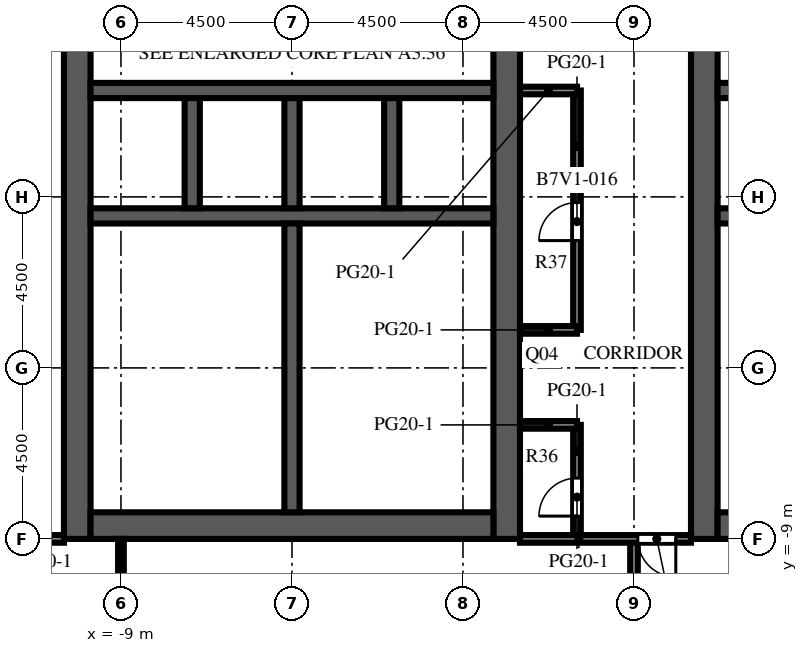
"""IFC4 building model, lengths in metres.
Left out: names, types, materials, properties, quantities, classifications, styles, units other than length and angle.
Written with IfcOpenShell. Run it as: python <this file> out.ifc"""

import sys

from ifc_helpers import new_model, si_unit, direction, frame, frame_2d, origin, place, context, subcontext, project, spatial, rectangle, extrude, element, fill, save


model = new_model("IFC4")
c1 = context("Model", 3, precision=1e-05, world=origin(), true_north=direction((0.0, 1.0)))
c2 = subcontext(c1, "Body", "Model", "MODEL_VIEW")
j1 = project(units=[si_unit("LENGTHUNIT", "METRE"), si_unit("PLANEANGLEUNIT", "RADIAN")], contexts=[c1])
p1 = place(None, origin())
s1 = spatial("IfcSite", under=j1, at=p1, CompositionType="ELEMENT")
p2 = place(p1, origin())
s2 = spatial("IfcBuilding", under=s1, at=p2, CompositionType="ELEMENT")
p3 = place(p2, frame((0.0, 0.0, 252.1)))
s3 = spatial("IfcBuildingStorey", under=s2, at=p3, CompositionType="ELEMENT", Elevation=252.1)
p4 = place(p3, frame((-10.15, -9.0, 0.0), z_axis=(0.0, 0.0, 1.0), x_axis=(0.0, 1.0, 0.0)))
e1 = element("IfcWall", 1, at=p4, inside=s3, PredefinedType="SHEAR", context=c2, shape_type="SweptSolid", body=[
    extrude(rectangle(XDim=27.5, YDim=0.7, at=frame_2d((13.75, 0.0))), origin(), (0.0, 0.0, 1.0), 4.1),
])
p5 = place(p4, frame((12.55, 0.0, 0.0)))
e2 = element("IfcOpeningElement", 2, at=p5, cuts=e1, PredefinedType="OPENING", context=c2, shape_type="SweptSolid", body=[
    extrude(rectangle(XDim=2.4, YDim=2.4, at=frame_2d((1.2, 1.2))), frame((0.0, 0.36, 0.0), z_axis=(0.0, -1.0, 0.0), x_axis=(1.0, 0.0, 0.0)), (0.0, 0.0, 1.0), 0.72),
])
p6 = place(p4, frame((6.825, 0.0, 0.0)))
e3 = element("IfcOpeningElement", 3, at=p6, cuts=e1, PredefinedType="OPENING", context=c2, shape_type="SweptSolid", body=[
    extrude(rectangle(XDim=1.2, YDim=2.1, at=frame_2d((0.6, 1.05))), frame((0.0, 0.36, 0.0), z_axis=(0.0, -1.0, 0.0), x_axis=(1.0, 0.0, 0.0)), (0.0, 0.0, 1.0), 0.72),
])
p7 = place(p4, frame((19.475, 0.0, 0.0)))
e4 = element("IfcOpeningElement", 4, at=p7, cuts=e1, PredefinedType="OPENING", context=c2, shape_type="SweptSolid", body=[
    extrude(rectangle(XDim=1.2, YDim=2.1, at=frame_2d((0.6, 1.05))), frame((0.0, 0.36, 0.0), z_axis=(0.0, -1.0, 0.0), x_axis=(1.0, 0.0, 0.0)), (0.0, 0.0, 1.0), 0.72),
])
p8 = place(p3, frame((1.15, -9.0, 0.0), z_axis=(0.0, 0.0, 1.0), x_axis=(0.0, 1.0, 0.0)))
e5 = element("IfcWall", 5, at=p8, inside=s3, PredefinedType="SHEAR", context=c2, shape_type="SweptSolid", body=[
    extrude(rectangle(XDim=27.5, YDim=0.7, at=frame_2d((13.75, 0.0))), origin(), (0.0, 0.0, 1.0), 4.1),
])
p9 = place(p8, frame((12.55, 0.0, 0.0)))
e6 = element("IfcOpeningElement", 6, at=p9, cuts=e5, PredefinedType="OPENING", context=c2, shape_type="SweptSolid", body=[
    extrude(rectangle(XDim=2.4, YDim=2.4, at=frame_2d((1.2, 1.2))), frame((0.0, 0.36, 0.0), z_axis=(0.0, -1.0, 0.0), x_axis=(1.0, 0.0, 0.0)), (0.0, 0.0, 1.0), 0.72),
])
p10 = place(p8, frame((3.9, 0.0, 0.0)))
e7 = element("IfcOpeningElement", 7, at=p10, cuts=e5, PredefinedType="OPENING", context=c2, shape_type="SweptSolid", body=[
    extrude(rectangle(XDim=1.2, YDim=2.1, at=frame_2d((0.6, 1.05))), frame((0.0, 0.36, 0.0), z_axis=(0.0, -1.0, 0.0), x_axis=(1.0, 0.0, 0.0)), (0.0, 0.0, 1.0), 0.72),
])
p11 = place(p8, frame((22.4, 0.0, 0.0)))
e8 = element("IfcOpeningElement", 8, at=p11, cuts=e5, PredefinedType="OPENING", context=c2, shape_type="SweptSolid", body=[
    extrude(rectangle(XDim=1.2, YDim=2.1, at=frame_2d((0.6, 1.05))), frame((0.0, 0.36, 0.0), z_axis=(0.0, -1.0, 0.0), x_axis=(1.0, 0.0, 0.0)), (0.0, 0.0, 1.0), 0.72),
])
p12 = place(p3, frame((-9.8, -8.65, 0.0), z_axis=(0.0, 0.0, 1.0), x_axis=(1.0, 0.0, 0.0)))
e9 = element("IfcWall", 9, at=p12, inside=s3, PredefinedType="SHEAR", context=c2, shape_type="SweptSolid", body=[
    extrude(rectangle(XDim=10.6, YDim=0.7, at=frame_2d((5.3, 0.0))), origin(), (0.0, 0.0, 1.0), 4.1),
])
p13 = place(p3, frame((-9.8, -0.5, 0.0), z_axis=(0.0, 0.0, 1.0), x_axis=(1.0, 0.0, 0.0)))
e10 = element("IfcWall", 10, at=p13, inside=s3, PredefinedType="SHEAR", context=c2, shape_type="SweptSolid", body=[
    extrude(rectangle(XDim=10.6, YDim=0.4, at=frame_2d((5.3, 0.0))), origin(), (0.0, 0.0, 1.0), 4.1),
])
p14 = place(p3, frame((-9.8, 2.8, 0.0), z_axis=(0.0, 0.0, 1.0), x_axis=(1.0, 0.0, 0.0)))
e11 = element("IfcWall", 11, at=p14, inside=s3, PredefinedType="SHEAR", context=c2, shape_type="SweptSolid", body=[
    extrude(rectangle(XDim=10.6, YDim=0.4, at=frame_2d((5.3, 0.0))), origin(), (0.0, 0.0, 1.0), 4.1),
])
p15 = place(p14, frame((0.688, 0.0, 0.0)))
e12 = element("IfcOpeningElement", 12, at=p15, cuts=e11, PredefinedType="OPENING", context=c2, shape_type="SweptSolid", body=[
    extrude(rectangle(XDim=1.1, YDim=2.1, at=frame_2d((0.55, 1.05))), frame((0.0, 0.21, 0.0), z_axis=(0.0, -1.0, 0.0), x_axis=(1.0, 0.0, 0.0)), (0.0, 0.0, 1.0), 0.42),
])
p16 = place(p14, frame((3.438, 0.0, 0.0)))
e13 = element("IfcOpeningElement", 13, at=p16, cuts=e11, PredefinedType="OPENING", context=c2, shape_type="SweptSolid", body=[
    extrude(rectangle(XDim=1.1, YDim=2.1, at=frame_2d((0.55, 1.05))), frame((0.0, 0.21, 0.0), z_axis=(0.0, -1.0, 0.0), x_axis=(1.0, 0.0, 0.0)), (0.0, 0.0, 1.0), 0.42),
])
p17 = place(p14, frame((6.113, 0.0, 0.0)))
e14 = element("IfcOpeningElement", 14, at=p17, cuts=e11, PredefinedType="OPENING", context=c2, shape_type="SweptSolid", body=[
    extrude(rectangle(XDim=1.0, YDim=2.1, at=frame_2d((0.5, 1.05))), frame((0.0, 0.21, 0.0), z_axis=(0.0, -1.0, 0.0), x_axis=(1.0, 0.0, 0.0)), (0.0, 0.0, 1.0), 0.42),
])
p18 = place(p14, frame((8.863, 0.0, 0.0)))
e15 = element("IfcOpeningElement", 15, at=p18, cuts=e11, PredefinedType="OPENING", context=c2, shape_type="SweptSolid", body=[
    extrude(rectangle(XDim=1.0, YDim=2.1, at=frame_2d((0.5, 1.05))), frame((0.0, 0.21, 0.0), z_axis=(0.0, -1.0, 0.0), x_axis=(1.0, 0.0, 0.0)), (0.0, 0.0, 1.0), 0.42),
])
for number, where, z_axis, x_axis in (
    (16, (-7.125, -0.3, 0.0), (0.0, 0.0, 1.0), (0.0, 1.0, 0.0)),
    (17, (-4.5, -0.3, 0.0), (0.0, 0.0, 1.0), (0.0, 1.0, 0.0)),
    (18, (-1.875, -0.3, 0.0), (0.0, 0.0, 1.0), (0.0, 1.0, 0.0)),
):
    element("IfcWall", number, at=place(p3, frame(where, z_axis=z_axis, x_axis=x_axis)), inside=s3, PredefinedType="SHEAR", context=c2, shape_type="SweptSolid", body=[
        extrude(rectangle(XDim=2.9, YDim=0.4, at=frame_2d((1.45, 0.0))), origin(), (0.0, 0.0, 1.0), 4.1),
    ])
p19 = place(p3, frame((-4.5, -8.3, 0.0), z_axis=(0.0, 0.0, 1.0), x_axis=(0.0, 1.0, 0.0)))
e19 = element("IfcWall", 19, at=p19, inside=s3, PredefinedType="SHEAR", context=c2, shape_type="SweptSolid", body=[
    extrude(rectangle(XDim=7.6, YDim=0.4, at=frame_2d((3.8, 0.0))), origin(), (0.0, 0.0, 1.0), 4.1),
])
p20 = place(p3, frame((6.35, -9.0, 0.0), z_axis=(0.0, 0.0, 1.0), x_axis=(0.0, 1.0, 0.0)))
e20 = element("IfcWall", 20, at=p20, inside=s3, PredefinedType="SHEAR", context=c2, shape_type="SweptSolid", body=[
    extrude(rectangle(XDim=27.5, YDim=0.7, at=frame_2d((13.75, 0.0))), origin(), (0.0, 0.0, 1.0), 4.1),
])
p21 = place(p20, frame((12.55, 0.0, 0.0)))
e21 = element("IfcOpeningElement", 21, at=p21, cuts=e20, PredefinedType="OPENING", context=c2, shape_type="SweptSolid", body=[
    extrude(rectangle(XDim=2.4, YDim=2.4, at=frame_2d((1.2, 1.2))), frame((0.0, 0.36, 0.0), z_axis=(0.0, -1.0, 0.0), x_axis=(1.0, 0.0, 0.0)), (0.0, 0.0, 1.0), 0.72),
])
p22 = place(p20, frame((3.9, 0.0, 0.0)))
e22 = element("IfcOpeningElement", 22, at=p22, cuts=e20, PredefinedType="OPENING", context=c2, shape_type="SweptSolid", body=[
    extrude(rectangle(XDim=1.2, YDim=2.1, at=frame_2d((0.6, 1.05))), frame((0.0, 0.36, 0.0), z_axis=(0.0, -1.0, 0.0), x_axis=(1.0, 0.0, 0.0)), (0.0, 0.0, 1.0), 0.72),
])
p23 = place(p20, frame((22.4, 0.0, 0.0)))
e23 = element("IfcOpeningElement", 23, at=p23, cuts=e20, PredefinedType="OPENING", context=c2, shape_type="SweptSolid", body=[
    extrude(rectangle(XDim=1.2, YDim=2.1, at=frame_2d((0.6, 1.05))), frame((0.0, 0.36, 0.0), z_axis=(0.0, -1.0, 0.0), x_axis=(1.0, 0.0, 0.0)), (0.0, 0.0, 1.0), 0.72),
])
p24 = place(p3, frame((6.7, -8.65, 0.0), z_axis=(0.0, 0.0, 1.0), x_axis=(1.0, 0.0, 0.0)))
e24 = element("IfcWall", 24, at=p24, inside=s3, PredefinedType="SHEAR", context=c2, shape_type="SweptSolid", body=[
    extrude(rectangle(XDim=10.6, YDim=0.7, at=frame_2d((5.3, 0.0))), origin(), (0.0, 0.0, 1.0), 4.1),
])
p25 = place(p3, frame((6.7, -0.5, 0.0), z_axis=(0.0, 0.0, 1.0), x_axis=(1.0, 0.0, 0.0)))
e25 = element("IfcWall", 25, at=p25, inside=s3, PredefinedType="SHEAR", context=c2, shape_type="SweptSolid", body=[
    extrude(rectangle(XDim=10.6, YDim=0.4, at=frame_2d((5.3, 0.0))), origin(), (0.0, 0.0, 1.0), 4.1),
])
p26 = place(p3, frame((6.7, 2.8, 0.0), z_axis=(0.0, 0.0, 1.0), x_axis=(1.0, 0.0, 0.0)))
e26 = element("IfcWall", 26, at=p26, inside=s3, PredefinedType="SHEAR", context=c2, shape_type="SweptSolid", body=[
    extrude(rectangle(XDim=10.6, YDim=0.4, at=frame_2d((5.3, 0.0))), origin(), (0.0, 0.0, 1.0), 4.1),
])
p27 = place(p26, frame((0.688, 0.0, 0.0)))
e27 = element("IfcOpeningElement", 27, at=p27, cuts=e26, PredefinedType="OPENING", context=c2, shape_type="SweptSolid", body=[
    extrude(rectangle(XDim=1.1, YDim=2.1, at=frame_2d((0.55, 1.05))), frame((0.0, 0.21, 0.0), z_axis=(0.0, -1.0, 0.0), x_axis=(1.0, 0.0, 0.0)), (0.0, 0.0, 1.0), 0.42),
])
p28 = place(p26, frame((3.438, 0.0, 0.0)))
e28 = element("IfcOpeningElement", 28, at=p28, cuts=e26, PredefinedType="OPENING", context=c2, shape_type="SweptSolid", body=[
    extrude(rectangle(XDim=1.1, YDim=2.1, at=frame_2d((0.55, 1.05))), frame((0.0, 0.21, 0.0), z_axis=(0.0, -1.0, 0.0), x_axis=(1.0, 0.0, 0.0)), (0.0, 0.0, 1.0), 0.42),
])
p29 = place(p26, frame((6.113, 0.0, 0.0)))
e29 = element("IfcOpeningElement", 29, at=p29, cuts=e26, PredefinedType="OPENING", context=c2, shape_type="SweptSolid", body=[
    extrude(rectangle(XDim=1.0, YDim=2.1, at=frame_2d((0.5, 1.05))), frame((0.0, 0.21, 0.0), z_axis=(0.0, -1.0, 0.0), x_axis=(1.0, 0.0, 0.0)), (0.0, 0.0, 1.0), 0.42),
])
p30 = place(p26, frame((8.863, 0.0, 0.0)))
e30 = element("IfcOpeningElement", 30, at=p30, cuts=e26, PredefinedType="OPENING", context=c2, shape_type="SweptSolid", body=[
    extrude(rectangle(XDim=1.0, YDim=2.1, at=frame_2d((0.5, 1.05))), frame((0.0, 0.21, 0.0), z_axis=(0.0, -1.0, 0.0), x_axis=(1.0, 0.0, 0.0)), (0.0, 0.0, 1.0), 0.42),
])
p31 = place(p3, frame((-0.7, -8.3, 0.0), z_axis=(0.0, 0.0, 1.0), x_axis=(0.0, 1.0, 0.0)))
e31 = element("IfcWall", 31, at=p31, inside=s3, PredefinedType="PARTITIONING", context=c2, shape_type="SweptSolid", body=[
    extrude(rectangle(XDim=2.584, YDim=0.1, at=frame_2d((1.292, 0.0))), origin(), (0.0, 0.0, 1.0), 3.65),
])
p32 = place(p31, frame((0.792, 0.0, 0.0)))
e32 = element("IfcOpeningElement", 32, at=p32, cuts=e31, PredefinedType="OPENING", context=c2, shape_type="SweptSolid", body=[
    extrude(rectangle(XDim=1.0, YDim=2.1, at=frame_2d((0.5, 1.05))), frame((0.0, 0.06, 0.0), z_axis=(0.0, -1.0, 0.0), x_axis=(1.0, 0.0, 0.0)), (0.0, 0.0, 1.0), 0.12),
])
p33 = place(p3, frame((-0.7, -5.716, 0.0), z_axis=(0.0, 0.0, 1.0), x_axis=(0.0, 1.0, 0.0)))
e33 = element("IfcWall", 33, at=p33, inside=s3, PredefinedType="PARTITIONING", context=c2, shape_type="SweptSolid", body=[
    extrude(rectangle(XDim=2.128, YDim=0.1, at=frame_2d((1.064, 0.0))), origin(), (0.0, 0.0, 1.0), 3.65),
])
p34 = place(p33, frame((0.564, 0.0, 0.0)))
e34 = element("IfcOpeningElement", 34, at=p34, cuts=e33, PredefinedType="OPENING", context=c2, shape_type="SweptSolid", body=[
    extrude(rectangle(XDim=1.0, YDim=2.1, at=frame_2d((0.5, 1.05))), frame((0.0, 0.06, 0.0), z_axis=(0.0, -1.0, 0.0), x_axis=(1.0, 0.0, 0.0)), (0.0, 0.0, 1.0), 0.12),
])
p35 = place(p3, frame((-0.7, -3.588, 0.0), z_axis=(0.0, 0.0, 1.0), x_axis=(0.0, 1.0, 0.0)))
e35 = element("IfcWall", 35, at=p35, inside=s3, PredefinedType="PARTITIONING", context=c2, shape_type="SweptSolid", body=[
    extrude(rectangle(XDim=2.888, YDim=0.1, at=frame_2d((1.444, 0.0))), origin(), (0.0, 0.0, 1.0), 3.65),
])
p36 = place(p35, frame((0.944, 0.0, 0.0)))
e36 = element("IfcOpeningElement", 36, at=p36, cuts=e35, PredefinedType="OPENING", context=c2, shape_type="SweptSolid", body=[
    extrude(rectangle(XDim=1.0, YDim=2.1, at=frame_2d((0.5, 1.05))), frame((0.0, 0.06, 0.0), z_axis=(0.0, -1.0, 0.0), x_axis=(1.0, 0.0, 0.0)), (0.0, 0.0, 1.0), 0.12),
])
for number, where, z_axis, x_axis in (
    (37, (-4.3, -5.716, 0.0), (0.0, 0.0, 1.0), (1.0, 0.0, 0.0)),
    (38, (-4.3, -3.588, 0.0), (0.0, 0.0, 1.0), (1.0, 0.0, 0.0)),
):
    element("IfcWall", number, at=place(p3, frame(where, z_axis=z_axis, x_axis=x_axis)), inside=s3, PredefinedType="PARTITIONING", context=c2, shape_type="SweptSolid", body=[
        extrude(rectangle(XDim=3.6, YDim=0.1, at=frame_2d((1.8, 0.0))), origin(), (0.0, 0.0, 1.0), 3.65),
    ])
p37 = place(p3, frame((-9.0, -17.5, 0.0), z_axis=(0.0, 0.0, 1.0), x_axis=(0.0, 1.0, 0.0)))
e39 = element("IfcWall", 39, at=p37, inside=s3, PredefinedType="PARTITIONING", context=c2, shape_type="SweptSolid", body=[
    extrude(rectangle(XDim=8.5, YDim=0.15, at=frame_2d((4.25, 0.0))), origin(), (0.0, 0.0, 1.0), 3.65),
])
p38 = place(p3, frame((3.0, -9.0, 0.0), z_axis=(0.0, 0.0, 1.0), x_axis=(0.0, 1.0, 0.0)))
e40 = element("IfcWall", 40, at=p38, inside=s3, PredefinedType="PARTITIONING", context=c2, shape_type="SweptSolid", body=[
    extrude(rectangle(XDim=3.0, YDim=0.2, at=frame_2d((1.5, 0.0))), origin(), (0.0, 0.0, 1.0), 3.65),
])
p39 = place(p38, frame((0.6, 0.0, 0.0)))
e41 = element("IfcOpeningElement", 41, at=p39, cuts=e40, PredefinedType="OPENING", context=c2, shape_type="SweptSolid", body=[
    extrude(rectangle(XDim=1.0, YDim=2.1, at=frame_2d((0.5, 1.05))), frame((0.0, 0.11, 0.0), z_axis=(0.0, -1.0, 0.0), x_axis=(1.0, 0.0, 0.0)), (0.0, 0.0, 1.0), 0.22),
])
p40 = place(p3, frame((3.0, -3.5, 0.0), z_axis=(0.0, 0.0, 1.0), x_axis=(0.0, 1.0, 0.0)))
e42 = element("IfcWall", 42, at=p40, inside=s3, PredefinedType="PARTITIONING", context=c2, shape_type="SweptSolid", body=[
    extrude(rectangle(XDim=6.3, YDim=0.2, at=frame_2d((3.15, 0.0))), origin(), (0.0, 0.0, 1.0), 3.65),
])
p41 = place(p40, frame((2.35, 0.0, 0.0)))
e43 = element("IfcOpeningElement", 43, at=p41, cuts=e42, PredefinedType="OPENING", context=c2, shape_type="SweptSolid", body=[
    extrude(rectangle(XDim=1.0, YDim=2.1, at=frame_2d((0.5, 1.05))), frame((0.0, 0.11, 0.0), z_axis=(0.0, -1.0, 0.0), x_axis=(1.0, 0.0, 0.0)), (0.0, 0.0, 1.0), 0.22),
])
p42 = place(p3, frame((4.5, -22.1, 0.0), z_axis=(0.0, 0.0, 1.0), x_axis=(0.0, 1.0, 0.0)))
e44 = element("IfcWall", 44, at=p42, inside=s3, PredefinedType="PARTITIONING", context=c2, shape_type="SweptSolid", body=[
    extrude(rectangle(XDim=13.1, YDim=0.2, at=frame_2d((6.55, 0.0))), origin(), (0.0, 0.0, 1.0), 3.65),
])
p43 = place(p3, frame((-10.5, -9.0, 0.0), z_axis=(0.0, 0.0, 1.0), x_axis=(-1.0, 0.0, 0.0)))
e45 = element("IfcWall", 45, at=p43, inside=s3, PredefinedType="PARTITIONING", context=c2, shape_type="SweptSolid", body=[
    extrude(rectangle(XDim=3.0, YDim=0.2, at=frame_2d((1.5, 0.0))), origin(), (0.0, 0.0, 1.0), 3.65),
])
p44 = place(p43, frame((1.15, 0.0, 0.0)))
e46 = element("IfcOpeningElement", 46, at=p44, cuts=e45, PredefinedType="OPENING", context=c2, shape_type="SweptSolid", body=[
    extrude(rectangle(XDim=1.0, YDim=2.1, at=frame_2d((0.5, 1.05))), frame((0.0, 0.11, 0.0), z_axis=(0.0, -1.0, 0.0), x_axis=(1.0, 0.0, 0.0)), (0.0, 0.0, 1.0), 0.22),
])
p45 = place(p3, frame((6.0, -9.0, 0.0), z_axis=(0.0, 0.0, 1.0), x_axis=(-1.0, 0.0, 0.0)))
e47 = element("IfcWall", 47, at=p45, inside=s3, PredefinedType="PARTITIONING", context=c2, shape_type="SweptSolid", body=[
    extrude(rectangle(XDim=4.5, YDim=0.2, at=frame_2d((2.25, 0.0))), origin(), (0.0, 0.0, 1.0), 3.65),
])
p46 = place(p45, frame((0.4, 0.0, 0.0)))
e48 = element("IfcOpeningElement", 48, at=p46, cuts=e47, PredefinedType="OPENING", context=c2, shape_type="SweptSolid", body=[
    extrude(rectangle(XDim=1.0, YDim=2.1, at=frame_2d((0.5, 1.05))), frame((0.0, 0.11, 0.0), z_axis=(0.0, -1.0, 0.0), x_axis=(1.0, 0.0, 0.0)), (0.0, 0.0, 1.0), 0.22),
])
for number, where, z_axis, x_axis in (
    (49, (1.5, -6.0, 0.0), (0.0, 0.0, 1.0), (1.0, 0.0, 0.0)),
    (50, (1.5, -3.5, 0.0), (0.0, 0.0, 1.0), (1.0, 0.0, 0.0)),
    (51, (1.5, 2.8, 0.0), (0.0, 0.0, 1.0), (1.0, 0.0, 0.0)),
):
    element("IfcWall", number, at=place(p3, frame(where, z_axis=z_axis, x_axis=x_axis)), inside=s3, PredefinedType="PARTITIONING", context=c2, shape_type="SweptSolid", body=[
        extrude(rectangle(XDim=1.5, YDim=0.2, at=frame_2d((0.75, 0.0))), origin(), (0.0, 0.0, 1.0), 3.65),
    ])
p47 = place(p15, origin())
e52 = element("IfcDoor", 52, at=p47, inside=s3, OperationType="DOUBLE_DOOR_SLIDING", PredefinedType="DOOR", context=c2, shape_type="SweptSolid", body=[
    extrude(rectangle(XDim=1.1, YDim=2.1, at=frame_2d((0.55, 1.05))), frame((0.0, 0.025, 0.0), z_axis=(0.0, -1.0, 0.0), x_axis=(1.0, 0.0, 0.0)), (0.0, 0.0, 1.0), 0.05),
])
fill(e12, e52)
p48 = place(p16, origin())
e53 = element("IfcDoor", 53, at=p48, inside=s3, OperationType="DOUBLE_DOOR_SLIDING", PredefinedType="DOOR", context=c2, shape_type="SweptSolid", body=[
    extrude(rectangle(XDim=1.1, YDim=2.1, at=frame_2d((0.55, 1.05))), frame((0.0, 0.025, 0.0), z_axis=(0.0, -1.0, 0.0), x_axis=(1.0, 0.0, 0.0)), (0.0, 0.0, 1.0), 0.05),
])
fill(e13, e53)
p49 = place(p5, origin())
e54 = element("IfcDoor", 54, at=p49, inside=s3, OperationType="DOUBLE_DOOR_DOUBLE_SWING", PredefinedType="DOOR", context=c2, shape_type="SweptSolid", body=[
    extrude(rectangle(XDim=2.4, YDim=2.4, at=frame_2d((1.2, 1.2))), frame((0.0, 0.025, 0.0), z_axis=(0.0, -1.0, 0.0), x_axis=(1.0, 0.0, 0.0)), (0.0, 0.0, 1.0), 0.05),
])
fill(e2, e54)
p50 = place(p9, origin())
e55 = element("IfcDoor", 55, at=p50, inside=s3, OperationType="DOUBLE_DOOR_DOUBLE_SWING", PredefinedType="DOOR", context=c2, shape_type="SweptSolid", body=[
    extrude(rectangle(XDim=2.4, YDim=2.4, at=frame_2d((1.2, 1.2))), frame((0.0, 0.025, 0.0), z_axis=(0.0, -1.0, 0.0), x_axis=(1.0, 0.0, 0.0)), (0.0, 0.0, 1.0), 0.05),
])
fill(e6, e55)
p51 = place(p21, origin())
e56 = element("IfcDoor", 56, at=p51, inside=s3, OperationType="DOUBLE_DOOR_DOUBLE_SWING", PredefinedType="DOOR", context=c2, shape_type="SweptSolid", body=[
    extrude(rectangle(XDim=2.4, YDim=2.4, at=frame_2d((1.2, 1.2))), frame((0.0, 0.025, 0.0), z_axis=(0.0, -1.0, 0.0), x_axis=(1.0, 0.0, 0.0)), (0.0, 0.0, 1.0), 0.05),
])
fill(e21, e56)
p52 = place(p6, origin())
e57 = element("IfcDoor", 57, at=p52, inside=s3, OperationType="SINGLE_SWING_LEFT", PredefinedType="DOOR", context=c2, shape_type="SweptSolid", body=[
    extrude(rectangle(XDim=1.2, YDim=2.1, at=frame_2d((0.6, 1.05))), frame((0.0, 0.025, 0.0), z_axis=(0.0, -1.0, 0.0), x_axis=(1.0, 0.0, 0.0)), (0.0, 0.0, 1.0), 0.05),
])
fill(e3, e57)
p53 = place(p17, origin())
e58 = element("IfcDoor", 58, at=p53, inside=s3, OperationType="SINGLE_SWING_LEFT", PredefinedType="DOOR", context=c2, shape_type="SweptSolid", body=[
    extrude(rectangle(XDim=1.0, YDim=2.1, at=frame_2d((0.5, 1.05))), frame((0.0, 0.025, 0.0), z_axis=(0.0, -1.0, 0.0), x_axis=(1.0, 0.0, 0.0)), (0.0, 0.0, 1.0), 0.05),
])
fill(e14, e58)
p54 = place(p18, origin())
e59 = element("IfcDoor", 59, at=p54, inside=s3, OperationType="SINGLE_SWING_RIGHT", PredefinedType="DOOR", context=c2, shape_type="SweptSolid", body=[
    extrude(rectangle(XDim=1.0, YDim=2.1, at=frame_2d((0.5, 1.05))), frame((0.0, 0.025, 0.0), z_axis=(0.0, -1.0, 0.0), x_axis=(1.0, 0.0, 0.0)), (0.0, 0.0, 1.0), 0.05),
])
fill(e15, e59)
p55 = place(p10, origin())
e60 = element("IfcDoor", 60, at=p55, inside=s3, OperationType="SINGLE_SWING_LEFT", PredefinedType="DOOR", context=c2, shape_type="SweptSolid", body=[
    extrude(rectangle(XDim=1.2, YDim=2.1, at=frame_2d((0.6, 1.05))), frame((0.0, 0.325, 0.0), z_axis=(0.0, -1.0, 0.0), x_axis=(1.0, 0.0, 0.0)), (0.0, 0.0, 1.0), 0.05),
])
fill(e7, e60)
p56 = place(p32, origin())
e61 = element("IfcDoor", 61, at=p56, inside=s3, OperationType="SINGLE_SWING_RIGHT", PredefinedType="DOOR", context=c2, shape_type="SweptSolid", body=[
    extrude(rectangle(XDim=1.0, YDim=2.1, at=frame_2d((0.5, 1.05))), frame((0.0, 0.025, 0.0), z_axis=(0.0, -1.0, 0.0), x_axis=(1.0, 0.0, 0.0)), (0.0, 0.0, 1.0), 0.05),
])
fill(e32, e61)
p57 = place(p34, origin())
e62 = element("IfcDoor", 62, at=p57, inside=s3, OperationType="SINGLE_SWING_LEFT", PredefinedType="DOOR", context=c2, shape_type="SweptSolid", body=[
    extrude(rectangle(XDim=1.0, YDim=2.1, at=frame_2d((0.5, 1.05))), frame((0.0, 0.025, 0.0), z_axis=(0.0, -1.0, 0.0), x_axis=(1.0, 0.0, 0.0)), (0.0, 0.0, 1.0), 0.05),
])
fill(e34, e62)
p58 = place(p36, origin())
e63 = element("IfcDoor", 63, at=p58, inside=s3, OperationType="SINGLE_SWING_RIGHT", PredefinedType="DOOR", context=c2, shape_type="SweptSolid", body=[
    extrude(rectangle(XDim=1.0, YDim=2.1, at=frame_2d((0.5, 1.05))), frame((0.0, 0.025, 0.0), z_axis=(0.0, -1.0, 0.0), x_axis=(1.0, 0.0, 0.0)), (0.0, 0.0, 1.0), 0.05),
])
fill(e36, e63)
p59 = place(p22, origin())
e64 = element("IfcDoor", 64, at=p59, inside=s3, OperationType="SINGLE_SWING_RIGHT", PredefinedType="DOOR", context=c2, shape_type="SweptSolid", body=[
    extrude(rectangle(XDim=1.2, YDim=2.1, at=frame_2d((0.6, 1.05))), frame((0.0, -0.275, 0.0), z_axis=(0.0, -1.0, 0.0), x_axis=(1.0, 0.0, 0.0)), (0.0, 0.0, 1.0), 0.05),
])
fill(e22, e64)
p60 = place(p46, origin())
e65 = element("IfcDoor", 65, at=p60, inside=s3, OperationType="SINGLE_SWING_LEFT", PredefinedType="DOOR", context=c2, shape_type="SweptSolid", body=[
    extrude(rectangle(XDim=1.0, YDim=2.1, at=frame_2d((0.5, 1.05))), frame((0.0, 0.025, 0.0), z_axis=(0.0, -1.0, 0.0), x_axis=(1.0, 0.0, 0.0)), (0.0, 0.0, 1.0), 0.05),
])
fill(e48, e65)
p61 = place(p39, origin())
e66 = element("IfcDoor", 66, at=p61, inside=s3, OperationType="SINGLE_SWING_LEFT", PredefinedType="DOOR", context=c2, shape_type="SweptSolid", body=[
    extrude(rectangle(XDim=1.0, YDim=2.1, at=frame_2d((0.5, 1.05))), frame((0.0, 0.025, 0.0), z_axis=(0.0, -1.0, 0.0), x_axis=(1.0, 0.0, 0.0)), (0.0, 0.0, 1.0), 0.05),
])
fill(e41, e66)
p62 = place(p41, origin())
e67 = element("IfcDoor", 67, at=p62, inside=s3, OperationType="SINGLE_SWING_LEFT", PredefinedType="DOOR", context=c2, shape_type="SweptSolid", body=[
    extrude(rectangle(XDim=1.0, YDim=2.1, at=frame_2d((0.5, 1.05))), frame((0.0, 0.025, 0.0), z_axis=(0.0, -1.0, 0.0), x_axis=(1.0, 0.0, 0.0)), (0.0, 0.0, 1.0), 0.05),
])
fill(e43, e67)
save(model, sys.argv[1])
